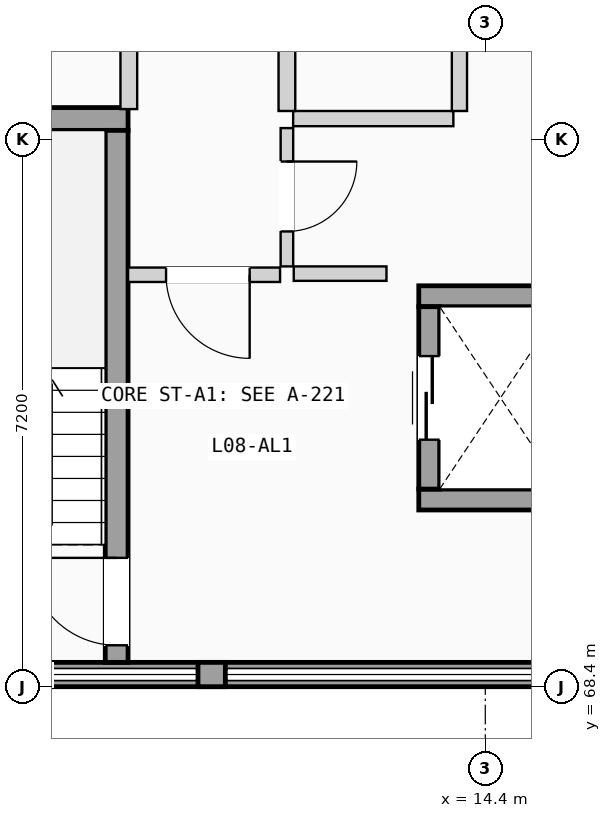
"""IFC4 building model, lengths in metres.
Left out: names, types, materials, properties, quantities, classifications, styles, units other than length and angle.
Written with IfcOpenShell. Run it as: python <this file> out.ifc"""

import sys

from ifc_helpers import new_model, si_unit, direction, frame, frame_2d, origin, place, context, subcontext, project, spatial, rectangle, extrude, element, fill, save


model = new_model("IFC4")
c1 = context("Model", 3, precision=1e-05, world=origin(), true_north=direction((0.0, 1.0)))
c2 = subcontext(c1, "Body", "Model", "MODEL_VIEW")
j1 = project(units=[si_unit("LENGTHUNIT", "METRE"), si_unit("PLANEANGLEUNIT", "RADIAN")], contexts=[c1])
p1 = place(None, origin())
s1 = spatial("IfcSite", under=j1, at=p1, CompositionType="ELEMENT")
p2 = place(p1, origin())
s2 = spatial("IfcBuilding", under=s1, at=p2, CompositionType="ELEMENT")
p3 = place(p2, frame((0.0, 0.0, 27.825)))
s3 = spatial("IfcBuildingStorey", under=s2, at=p3, CompositionType="ELEMENT", Elevation=27.825)
p4 = place(p3, frame((0.0, 68.56, 0.0), z_axis=(0.0, 0.0, 1.0), x_axis=(1.0, 0.0, 0.0)))
e1 = element("IfcWall", 1, at=p4, inside=s3, PredefinedType="SOLIDWALL", context=c2, shape_type="SweptSolid", body=[
    extrude(rectangle(XDim=21.6, YDim=0.32, at=frame_2d((10.8, 0.0))), origin(), (0.0, 0.0, 1.0), 1.11),
])
p5 = place(p3, frame((10.62, 68.56, 1.11), z_axis=(0.0, 0.0, 1.0), x_axis=(1.0, 0.0, 0.0)))
e2 = element("IfcWall", 2, at=p5, inside=s3, PredefinedType="SOLIDWALL", context=c2, shape_type="SweptSolid", body=[
    extrude(rectangle(XDim=0.36, YDim=0.32, at=frame_2d((0.18, 0.0))), origin(), (0.0, 0.0, 1.0), 1.78),
])
p6 = place(p3, frame((5.7, 75.87, 0.0), z_axis=(0.0, 0.0, 1.0), x_axis=(1.0, 0.0, 0.0)))
e3 = element("IfcWall", 3, at=p6, inside=s3, PredefinedType="SHEAR", context=c2, shape_type="SweptSolid", body=[
    extrude(rectangle(XDim=4.0, YDim=0.3, at=frame_2d((2.0, 0.0))), origin(), (0.0, 0.0, 1.0), 2.89),
])
p7 = place(p3, frame((9.55, 68.72, 0.0), z_axis=(0.0, 0.0, 1.0), x_axis=(0.0, 1.0, 0.0)))
e4 = element("IfcWall", 4, at=p7, inside=s3, PredefinedType="SHEAR", context=c2, shape_type="SweptSolid", body=[
    extrude(rectangle(XDim=7.0, YDim=0.3, at=frame_2d((3.5, 0.0))), origin(), (0.0, 0.0, 1.0), 2.89),
])
p8 = place(p7, frame((0.225, 0.0, 0.0)))
e5 = element("IfcOpeningElement", 5, at=p8, cuts=e4, PredefinedType="OPENING", context=c2, shape_type="SweptSolid", body=[
    extrude(rectangle(XDim=1.15, YDim=2.12, at=frame_2d((0.575, 1.06))), frame((0.0, 0.16, 0.0), z_axis=(0.0, -1.0, 0.0), x_axis=(1.0, 0.0, 0.0)), (0.0, 0.0, 1.0), 0.32),
])
for number, where, z_axis, x_axis in (
    (6, (13.525, 70.863, 0.0), (0.0, 0.0, 1.0), (1.0, 0.0, 0.0)),
    (7, (13.525, 73.538, 0.0), (0.0, 0.0, 1.0), (1.0, 0.0, 0.0)),
):
    element("IfcWall", number, at=place(p3, frame(where, z_axis=z_axis, x_axis=x_axis)), inside=s3, PredefinedType="SHEAR", context=c2, shape_type="SweptSolid", body=[
        extrude(rectangle(XDim=2.15, YDim=0.275, at=frame_2d((1.075, 0.0))), origin(), (0.0, 0.0, 1.0), 2.89),
    ])
p9 = place(p3, frame((13.663, 71.0, 0.0), z_axis=(0.0, 0.0, 1.0), x_axis=(0.0, 1.0, 0.0)))
e8 = element("IfcWall", 8, at=p9, inside=s3, PredefinedType="SHEAR", context=c2, shape_type="SweptSolid", body=[
    extrude(rectangle(XDim=2.4, YDim=0.275, at=frame_2d((1.2, 0.0))), origin(), (0.0, 0.0, 1.0), 2.89),
])
p10 = place(p9, frame((0.65, 0.0, 0.0)))
e9 = element("IfcOpeningElement", 9, at=p10, cuts=e8, PredefinedType="OPENING", context=c2, shape_type="SweptSolid", body=[
    extrude(rectangle(XDim=1.1, YDim=2.15, at=frame_2d((0.55, 1.075))), frame((0.0, 0.147, 0.0), z_axis=(0.0, -1.0, 0.0), x_axis=(1.0, 0.0, 0.0)), (0.0, 0.0, 1.0), 0.295),
])
p11 = place(p3, frame((11.88, 73.835, 0.0), z_axis=(0.0, 0.0, 1.0), x_axis=(1.0, 0.0, 0.0)))
e10 = element("IfcWall", 10, at=p11, inside=s3, PredefinedType="PARTITIONING", context=c2, shape_type="SweptSolid", body=[
    extrude(rectangle(XDim=1.22, YDim=0.19, at=frame_2d((0.61, 0.0))), origin(), (0.0, 0.0, 1.0), 2.87),
])
p12 = place(p3, frame((9.7, 73.82, 0.0), z_axis=(0.0, 0.0, 1.0), x_axis=(1.0, 0.0, 0.0)))
e11 = element("IfcWall", 11, at=p12, inside=s3, PredefinedType="PARTITIONING", context=c2, shape_type="SweptSolid", body=[
    extrude(rectangle(XDim=2.0, YDim=0.19, at=frame_2d((1.0, 0.0))), origin(), (0.0, 0.0, 1.0), 2.87),
])
p13 = place(p12, frame((0.5, 0.0, 0.0)))
e12 = element("IfcOpeningElement", 12, at=p13, cuts=e11, PredefinedType="OPENING", context=c2, shape_type="SweptSolid", body=[
    extrude(rectangle(XDim=1.1, YDim=2.12, at=frame_2d((0.55, 1.06))), frame((0.0, 0.105, 0.0), z_axis=(0.0, -1.0, 0.0), x_axis=(1.0, 0.0, 0.0)), (0.0, 0.0, 1.0), 0.21),
])
p14 = place(p3, frame((11.79, 73.93, 0.0), z_axis=(0.0, 0.0, 1.0), x_axis=(0.0, 1.0, 0.0)))
e13 = element("IfcWall", 13, at=p14, inside=s3, PredefinedType="PARTITIONING", context=c2, shape_type="SweptSolid", body=[
    extrude(rectangle(XDim=1.82, YDim=0.165, at=frame_2d((0.91, 0.0))), origin(), (0.0, 0.0, 1.0), 2.87),
])
p15 = place(p14, frame((0.46, 0.0, 0.0)))
e14 = element("IfcOpeningElement", 14, at=p15, cuts=e13, PredefinedType="OPENING", context=c2, shape_type="SweptSolid", body=[
    extrude(rectangle(XDim=0.92, YDim=2.04, at=frame_2d((0.46, 1.02))), frame((0.0, 0.093, 0.0), z_axis=(0.0, -1.0, 0.0), x_axis=(1.0, 0.0, 0.0)), (0.0, 0.0, 1.0), 0.185),
])
p16 = place(p3, frame((11.872, 75.875, 0.0), z_axis=(0.0, 0.0, 1.0), x_axis=(1.0, 0.0, 0.0)))
e15 = element("IfcWall", 15, at=p16, inside=s3, PredefinedType="PLUMBINGWALL", context=c2, shape_type="SweptSolid", body=[
    extrude(rectangle(XDim=2.108, YDim=0.2, at=frame_2d((1.054, 0.0))), origin(), (0.0, 0.0, 1.0), 2.87),
])
p17 = place(p3, frame((9.71, 76.0, 0.0), z_axis=(0.0, 0.0, 1.0), x_axis=(0.0, 1.0, 0.0)))
e16 = element("IfcWall", 16, at=p17, inside=s3, PredefinedType="PLUMBINGWALL", context=c2, shape_type="SweptSolid", body=[
    extrude(rectangle(XDim=4.912, YDim=0.22, at=frame_2d((2.456, 0.0))), origin(), (0.0, 0.0, 1.0), 2.87),
])
p18 = place(p3, frame((11.79, 75.975, 0.0), z_axis=(0.0, 0.0, 1.0), x_axis=(0.0, 1.0, 0.0)))
e17 = element("IfcWall", 17, at=p18, inside=s3, PredefinedType="PLUMBINGWALL", context=c2, shape_type="SweptSolid", body=[
    extrude(rectangle(XDim=4.937, YDim=0.22, at=frame_2d((2.469, 0.0))), origin(), (0.0, 0.0, 1.0), 2.87),
])
p19 = place(p3, frame((14.06, 75.975, 0.0), z_axis=(0.0, 0.0, 1.0), x_axis=(0.0, 1.0, 0.0)))
e18 = element("IfcWall", 18, at=p19, inside=s3, PredefinedType="PLUMBINGWALL", context=c2, shape_type="SweptSolid", body=[
    extrude(rectangle(XDim=4.937, YDim=0.2, at=frame_2d((2.469, 0.0))), origin(), (0.0, 0.0, 1.0), 2.87),
])
p20 = place(p8, origin())
e19 = element("IfcDoor", 19, at=p20, inside=s3, OperationType="SINGLE_SWING_RIGHT", PredefinedType="DOOR", context=c2, shape_type="SweptSolid", body=[
    extrude(rectangle(XDim=1.15, YDim=2.12, at=frame_2d((0.575, 1.06))), frame((0.0, 0.025, 0.0), z_axis=(0.0, -1.0, 0.0), x_axis=(1.0, 0.0, 0.0)), (0.0, 0.0, 1.0), 0.05),
])
fill(e5, e19)
p21 = place(p10, origin())
e20 = element("IfcDoor", 20, at=p21, inside=s3, OperationType="SLIDING_TO_LEFT", PredefinedType="DOOR", context=c2, shape_type="SweptSolid", body=[
    extrude(rectangle(XDim=1.1, YDim=2.15, at=frame_2d((0.55, 1.075))), frame((0.0, 0.025, 0.0), z_axis=(0.0, -1.0, 0.0), x_axis=(1.0, 0.0, 0.0)), (0.0, 0.0, 1.0), 0.05),
])
fill(e9, e20)
p22 = place(p13, frame((1.1, 0.0, 0.0), z_axis=(0.0, 0.0, 1.0), x_axis=(-1.0, 0.0, 0.0)))
e21 = element("IfcDoor", 21, at=p22, inside=s3, OperationType="SINGLE_SWING_RIGHT", PredefinedType="DOOR", context=c2, shape_type="SweptSolid", body=[
    extrude(rectangle(XDim=1.1, YDim=2.12, at=frame_2d((0.55, 1.06))), frame((0.0, 0.025, 0.0), z_axis=(0.0, -1.0, 0.0), x_axis=(1.0, 0.0, 0.0)), (0.0, 0.0, 1.0), 0.05),
])
fill(e12, e21)
p23 = place(p15, frame((0.92, 0.0, 0.0), z_axis=(0.0, 0.0, 1.0), x_axis=(-1.0, 0.0, 0.0)))
e22 = element("IfcDoor", 22, at=p23, inside=s3, OperationType="SINGLE_SWING_RIGHT", PredefinedType="DOOR", context=c2, shape_type="SweptSolid", body=[
    extrude(rectangle(XDim=0.92, YDim=2.04, at=frame_2d((0.46, 1.02))), frame((0.0, 0.025, 0.0), z_axis=(0.0, -1.0, 0.0), x_axis=(1.0, 0.0, 0.0)), (0.0, 0.0, 1.0), 0.05),
])
fill(e14, e22)
save(model, sys.argv[1])
